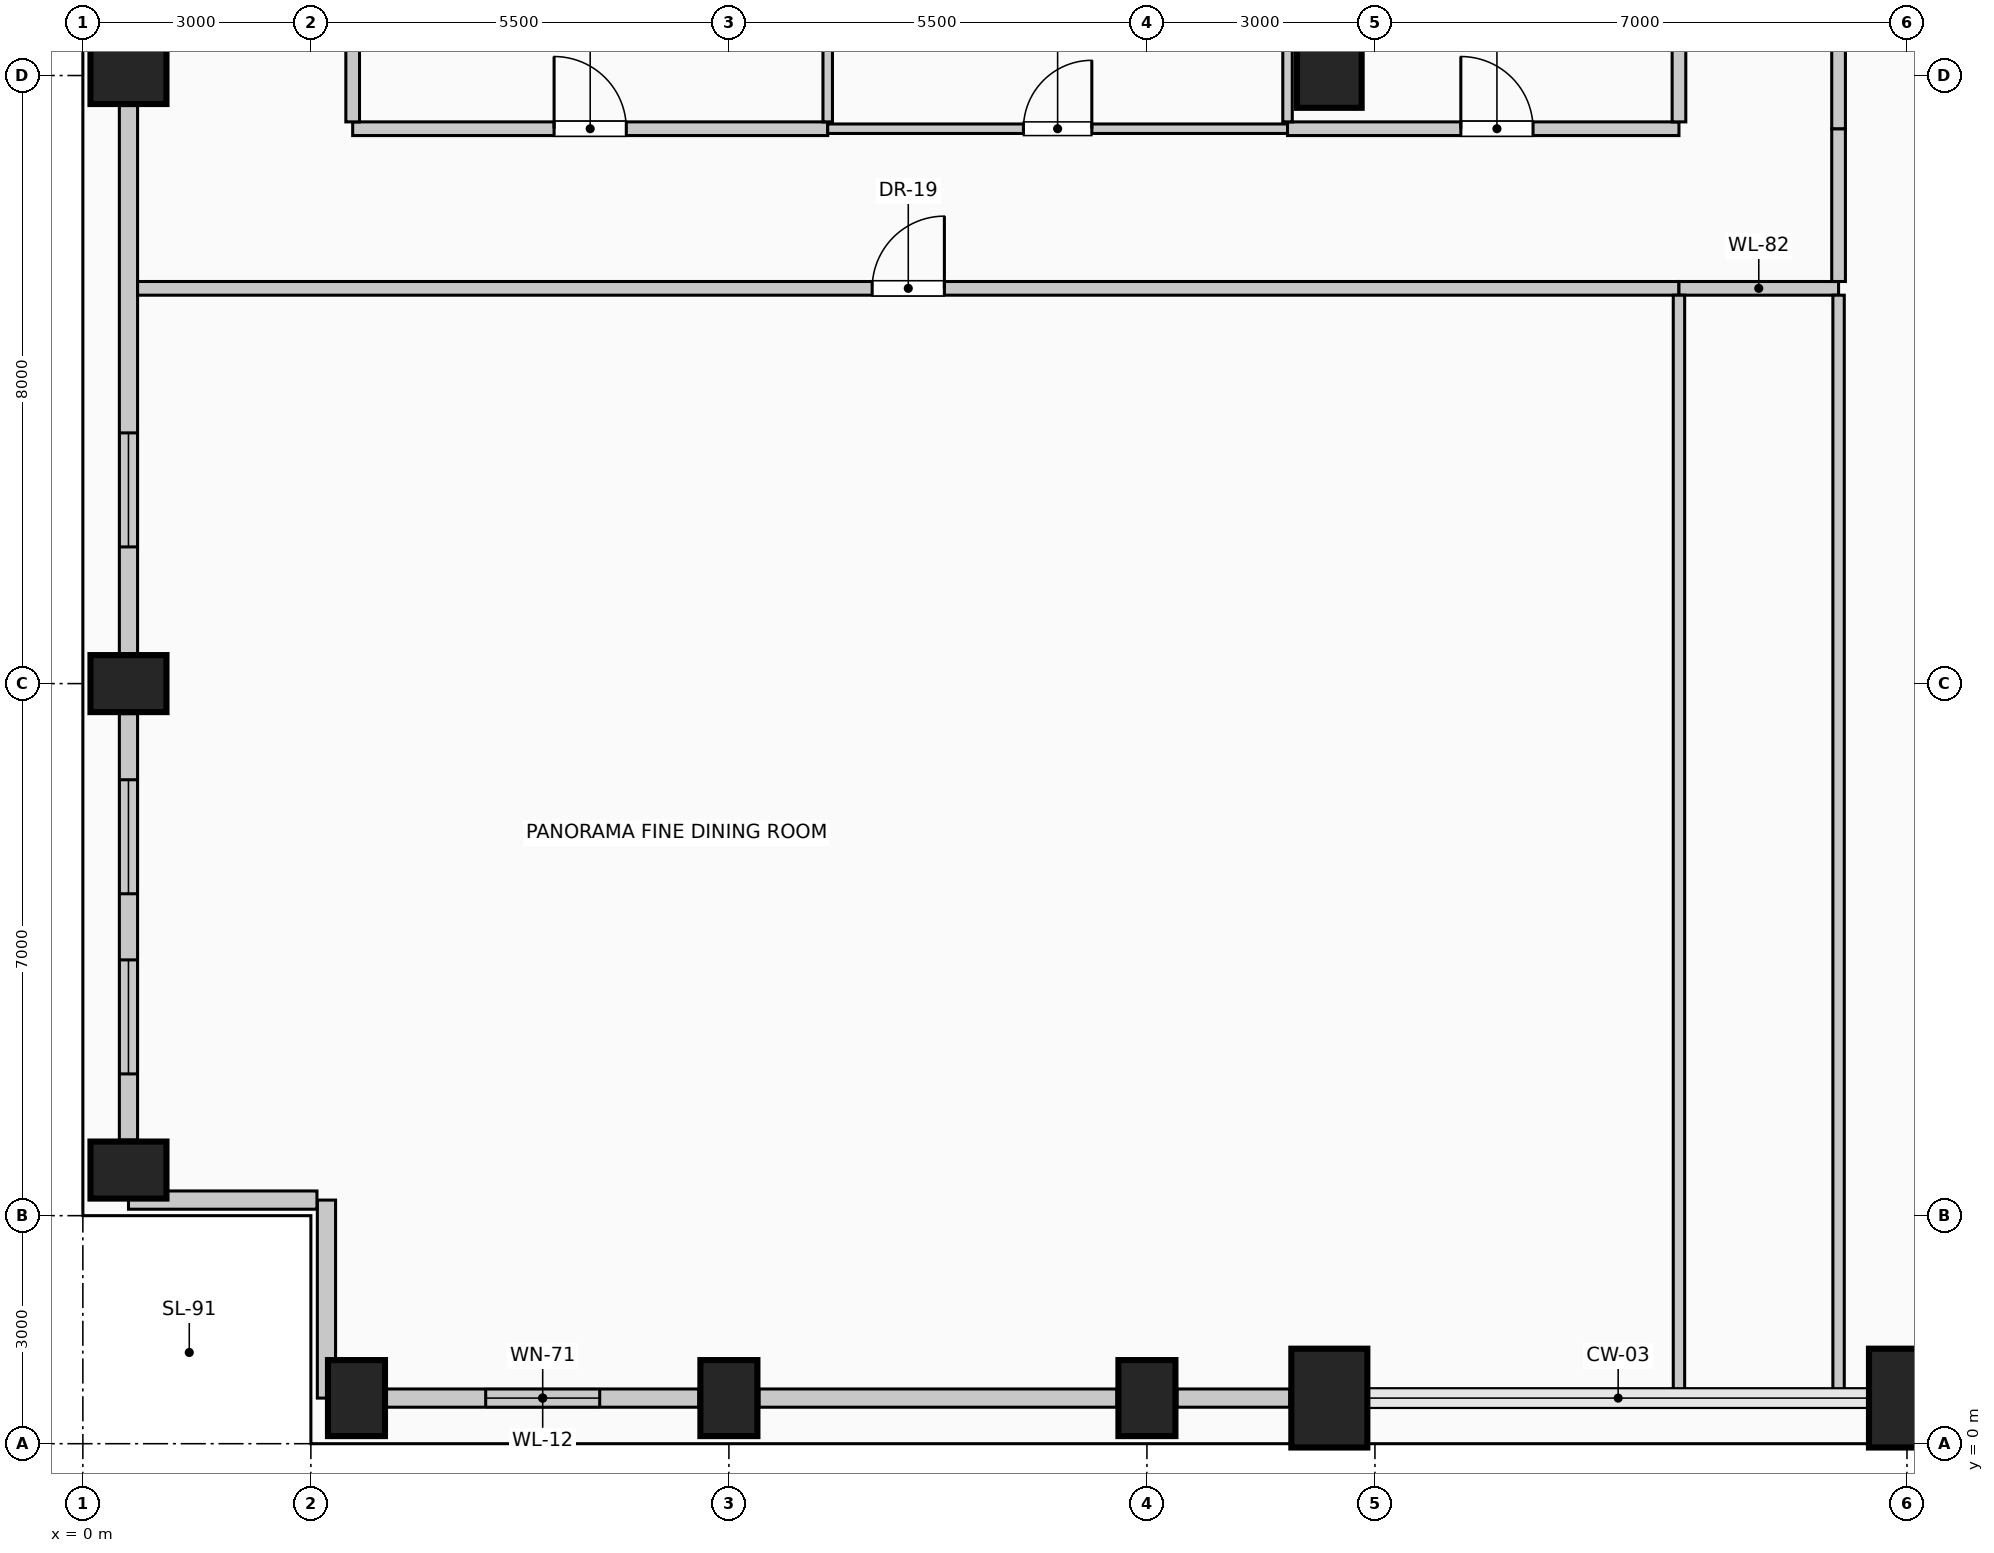
"""IFC4 building model, lengths in metres.
Left out: names, types, materials, properties, quantities, classifications, styles, units other than length and angle.
Written with IfcOpenShell. Run it as: python <this file> out.ifc"""

import sys

from ifc_helpers import new_model, si_unit, direction, frame, frame_2d, origin, origin_2d, place, context, subcontext, project, spatial, rectangle, circle, extrude, element, fill, save


model = new_model("IFC4")
c1 = context("Model", 3, precision=1e-05, world=origin(), true_north=direction((0.0, 1.0)))
c2 = subcontext(c1, "Body", "Model", "MODEL_VIEW")
j1 = project(units=[si_unit("LENGTHUNIT", "METRE"), si_unit("PLANEANGLEUNIT", "RADIAN")], contexts=[c1])
p1 = place(None, origin())
s1 = spatial("IfcSite", under=j1, at=p1, CompositionType="ELEMENT")
p2 = place(p1, origin())
s2 = spatial("IfcBuilding", under=s1, at=p2, CompositionType="ELEMENT")
p3 = place(p2, frame((0.0, 0.0, 243.8)))
s3 = spatial("IfcBuildingStorey", under=s2, at=p3, CompositionType="ELEMENT", Elevation=243.8)
for number, where, z_axis, x_axis in (
    (1, (3.6, 0.6, 0.0), (0.0, 0.0, 1.0), (1.0, 0.0, 0.0)),
    (2, (8.5, 0.6, 0.0), (0.0, 0.0, 1.0), (1.0, 0.0, 0.0)),
    (3, (14.0, 0.6, 0.0), (0.0, 0.0, 1.0), (1.0, 0.0, 0.0)),
):
    element("IfcColumn", number, at=place(p3, frame(where, z_axis=z_axis, x_axis=x_axis)), inside=s3, PredefinedType="COLUMN", context=c2, shape_type="SweptSolid", body=[
        extrude(rectangle(XDim=0.75, YDim=1.0, at=origin_2d()), origin(), (0.0, 0.0, 1.0), 4.8),
    ])
for number, where, z_axis, x_axis in (
    (4, (16.4, 0.6, 0.0), (0.0, 0.0, 1.0), (1.0, 0.0, 0.0)),
    (5, (24.0, 0.6, 0.0), (0.0, 0.0, 1.0), (1.0, 0.0, 0.0)),
):
    element("IfcColumn", number, at=place(p3, frame(where, z_axis=z_axis, x_axis=x_axis)), inside=s3, PredefinedType="COLUMN", context=c2, shape_type="SweptSolid", body=[
        extrude(rectangle(XDim=1.0, YDim=1.3, at=origin_2d()), origin(), (0.0, 0.0, 1.0), 4.8),
    ])
for number, where, z_axis, x_axis in (
    (6, (0.6, 3.6, 0.0), (0.0, 0.0, 1.0), (0.0, 1.0, 0.0)),
    (7, (0.6, 10.0, 0.0), (0.0, 0.0, 1.0), (0.0, 1.0, 0.0)),
    (8, (0.6, 18.0, 0.0), (0.0, 0.0, 1.0), (0.0, 1.0, 0.0)),
):
    element("IfcColumn", number, at=place(p3, frame(where, z_axis=z_axis, x_axis=x_axis)), inside=s3, PredefinedType="COLUMN", context=c2, shape_type="SweptSolid", body=[
        extrude(rectangle(XDim=0.75, YDim=1.0, at=origin_2d()), origin(), (0.0, 0.0, 1.0), 4.8),
    ])
p4 = place(p3, frame((16.4, 18.0, 0.0), z_axis=(0.0, 0.0, 1.0), x_axis=(1.0, 0.0, 0.0)))
e9 = element("IfcColumn", 9, at=p4, inside=s3, PredefinedType="COLUMN", context=c2, shape_type="SweptSolid", body=[
    extrude(circle(Radius=0.425, at=origin_2d()), origin(), (0.0, 0.0, 1.0), 4.8),
])
p5 = place(p3, frame((8.105, 0.6, 0.0), z_axis=(0.0, 0.0, 1.0), x_axis=(-1.0, 0.0, 0.0)))
e10 = element("IfcWall", 10, at=p5, inside=s3, PredefinedType="SOLIDWALL", context=c2, shape_type="SweptSolid", body=[
    extrude(rectangle(XDim=4.11, YDim=0.24, at=frame_2d((2.055, 0.0))), origin(), (0.0, 0.0, 1.0), 3.8),
])
p6 = place(p5, frame((1.305, 0.0, 0.42)))
e11 = element("IfcOpeningElement", 11, at=p6, cuts=e10, PredefinedType="OPENING", context=c2, shape_type="SweptSolid", body=[
    extrude(rectangle(XDim=1.5, YDim=2.2, at=frame_2d((0.75, 1.1))), frame((0.0, 0.13, 0.0), z_axis=(0.0, -1.0, 0.0), x_axis=(1.0, 0.0, 0.0)), (0.0, 0.0, 1.0), 0.26),
])
p7 = place(p3, frame((13.605, 0.6, 0.0), z_axis=(0.0, 0.0, 1.0), x_axis=(-1.0, 0.0, 0.0)))
e12 = element("IfcWall", 12, at=p7, inside=s3, PredefinedType="SOLIDWALL", context=c2, shape_type="SweptSolid", body=[
    extrude(rectangle(XDim=4.71, YDim=0.24, at=frame_2d((2.355, 0.0))), origin(), (0.0, 0.0, 1.0), 3.8),
])
p8 = place(p3, frame((15.88, 0.6, 0.0), z_axis=(0.0, 0.0, 1.0), x_axis=(-1.0, 0.0, 0.0)))
e13 = element("IfcWall", 13, at=p8, inside=s3, PredefinedType="SOLIDWALL", context=c2, shape_type="SweptSolid", body=[
    extrude(rectangle(XDim=1.485, YDim=0.24, at=frame_2d((0.742, 0.0))), origin(), (0.0, 0.0, 1.0), 3.8),
])
p9 = place(p3, frame((0.6, 3.995, 0.0), z_axis=(0.0, 0.0, 1.0), x_axis=(0.0, 1.0, 0.0)))
e14 = element("IfcWall", 14, at=p9, inside=s3, PredefinedType="SOLIDWALL", context=c2, shape_type="SweptSolid", body=[
    extrude(rectangle(XDim=5.61, YDim=0.24, at=frame_2d((2.805, 0.0))), origin(), (0.0, 0.0, 1.0), 3.8),
])
p10 = place(p9, frame((0.87, 0.0, 0.42)))
e15 = element("IfcOpeningElement", 15, at=p10, cuts=e14, PredefinedType="OPENING", context=c2, shape_type="SweptSolid", body=[
    extrude(rectangle(XDim=1.5, YDim=2.2, at=frame_2d((0.75, 1.1))), frame((0.0, 0.13, 0.0), z_axis=(0.0, -1.0, 0.0), x_axis=(1.0, 0.0, 0.0)), (0.0, 0.0, 1.0), 0.26),
])
p11 = place(p9, frame((3.24, 0.0, 0.42)))
e16 = element("IfcOpeningElement", 16, at=p11, cuts=e14, PredefinedType="OPENING", context=c2, shape_type="SweptSolid", body=[
    extrude(rectangle(XDim=1.5, YDim=2.2, at=frame_2d((0.75, 1.1))), frame((0.0, 0.13, 0.0), z_axis=(0.0, -1.0, 0.0), x_axis=(1.0, 0.0, 0.0)), (0.0, 0.0, 1.0), 0.26),
])
p12 = place(p3, frame((0.6, 10.395, 0.0), z_axis=(0.0, 0.0, 1.0), x_axis=(0.0, 1.0, 0.0)))
e17 = element("IfcWall", 17, at=p12, inside=s3, PredefinedType="SOLIDWALL", context=c2, shape_type="SweptSolid", body=[
    extrude(rectangle(XDim=7.21, YDim=0.24, at=frame_2d((3.605, 0.0))), origin(), (0.0, 0.0, 1.0), 3.8),
])
p13 = place(p12, frame((1.403, 0.0, 0.42)))
e18 = element("IfcOpeningElement", 18, at=p13, cuts=e17, PredefinedType="OPENING", context=c2, shape_type="SweptSolid", body=[
    extrude(rectangle(XDim=1.5, YDim=2.2, at=frame_2d((0.75, 1.1))), frame((0.0, 0.13, 0.0), z_axis=(0.0, -1.0, 0.0), x_axis=(1.0, 0.0, 0.0)), (0.0, 0.0, 1.0), 0.26),
])
p14 = place(p3, frame((3.205, 0.6, 0.0), z_axis=(0.0, 0.0, 1.0), x_axis=(0.0, 1.0, 0.0)))
e19 = element("IfcWall", 19, at=p14, inside=s3, PredefinedType="SOLIDWALL", context=c2, shape_type="SweptSolid", body=[
    extrude(rectangle(XDim=2.605, YDim=0.24, at=frame_2d((1.302, 0.0))), origin(), (0.0, 0.0, 1.0), 4.55),
])
p15 = place(p3, frame((3.08, 3.205, 0.0), z_axis=(0.0, 0.0, 1.0), x_axis=(-1.0, 0.0, 0.0)))
e20 = element("IfcWall", 20, at=p15, inside=s3, PredefinedType="SOLIDWALL", context=c2, shape_type="SweptSolid", body=[
    extrude(rectangle(XDim=2.48, YDim=0.24, at=frame_2d((1.24, 0.0))), origin(), (0.0, 0.0, 1.0), 4.55),
])
p16 = place(p3, frame((0.72, 15.2, 0.0), z_axis=(0.0, 0.0, 1.0), x_axis=(1.0, 0.0, 0.0)))
e21 = element("IfcWall", 21, at=p16, inside=s3, PredefinedType="PARTITIONING", context=c2, shape_type="SweptSolid", body=[
    extrude(rectangle(XDim=20.28, YDim=0.18, at=frame_2d((10.14, 0.0))), origin(), (0.0, 0.0, 1.0), 4.55),
])
p17 = place(p16, frame((9.665, 0.0, 0.0)))
e22 = element("IfcOpeningElement", 22, at=p17, cuts=e21, PredefinedType="OPENING", context=c2, shape_type="SweptSolid", body=[
    extrude(rectangle(XDim=0.95, YDim=2.15, at=frame_2d((0.475, 1.075))), frame((0.0, 0.1, 0.0), z_axis=(0.0, -1.0, 0.0), x_axis=(1.0, 0.0, 0.0)), (0.0, 0.0, 1.0), 0.2),
])
p18 = place(p3, frame((21.0, 15.2, 0.0), z_axis=(0.0, 0.0, 1.0), x_axis=(1.0, 0.0, 0.0)))
e23 = element("IfcWall", 23, at=p18, inside=s3, PredefinedType="PARTITIONING", context=c2, shape_type="SweptSolid", body=[
    extrude(rectangle(XDim=2.1, YDim=0.18, at=frame_2d((1.05, 0.0))), origin(), (0.0, 0.0, 1.0), 4.55),
])
p19 = place(p3, frame((3.55, 17.3, 0.0), z_axis=(0.0, 0.0, 1.0), x_axis=(1.0, 0.0, 0.0)))
e24 = element("IfcWall", 24, at=p19, inside=s3, PredefinedType="PARTITIONING", context=c2, shape_type="SweptSolid", body=[
    extrude(rectangle(XDim=6.25, YDim=0.18, at=frame_2d((3.125, 0.0))), origin(), (0.0, 0.0, 1.0), 4.55),
])
p20 = place(p19, frame((2.65, 0.0, 0.0)))
e25 = element("IfcOpeningElement", 25, at=p20, cuts=e24, PredefinedType="OPENING", context=c2, shape_type="SweptSolid", body=[
    extrude(rectangle(XDim=0.95, YDim=2.15, at=frame_2d((0.475, 1.075))), frame((0.0, 0.1, 0.0), z_axis=(0.0, -1.0, 0.0), x_axis=(1.0, 0.0, 0.0)), (0.0, 0.0, 1.0), 0.2),
])
p21 = place(p3, frame((9.8, 17.3, 0.0), z_axis=(0.0, 0.0, 1.0), x_axis=(1.0, 0.0, 0.0)))
e26 = element("IfcWall", 26, at=p21, inside=s3, PredefinedType="PARTITIONING", context=c2, shape_type="SweptSolid", body=[
    extrude(rectangle(XDim=6.05, YDim=0.125, at=frame_2d((3.025, 0.0))), origin(), (0.0, 0.0, 1.0), 4.55),
])
p22 = place(p21, frame((2.575, 0.0, 0.0)))
e27 = element("IfcOpeningElement", 27, at=p22, cuts=e26, PredefinedType="OPENING", context=c2, shape_type="SweptSolid", body=[
    extrude(rectangle(XDim=0.9, YDim=2.1, at=frame_2d((0.45, 1.05))), frame((0.0, 0.073, 0.0), z_axis=(0.0, -1.0, 0.0), x_axis=(1.0, 0.0, 0.0)), (0.0, 0.0, 1.0), 0.145),
])
p23 = place(p3, frame((15.85, 17.3, 0.0), z_axis=(0.0, 0.0, 1.0), x_axis=(1.0, 0.0, 0.0)))
e28 = element("IfcWall", 28, at=p23, inside=s3, PredefinedType="PARTITIONING", context=c2, shape_type="SweptSolid", body=[
    extrude(rectangle(XDim=5.15, YDim=0.18, at=frame_2d((2.575, 0.0))), origin(), (0.0, 0.0, 1.0), 4.55),
])
p24 = place(p23, frame((2.28, 0.0, 0.0)))
e29 = element("IfcOpeningElement", 29, at=p24, cuts=e28, PredefinedType="OPENING", context=c2, shape_type="SweptSolid", body=[
    extrude(rectangle(XDim=0.95, YDim=2.15, at=frame_2d((0.475, 1.075))), frame((0.0, 0.1, 0.0), z_axis=(0.0, -1.0, 0.0), x_axis=(1.0, 0.0, 0.0)), (0.0, 0.0, 1.0), 0.2),
])
p25 = place(p3, frame((3.55, 17.39, 0.0), z_axis=(0.0, 0.0, 1.0), x_axis=(0.0, 1.0, 0.0)))
e30 = element("IfcWall", 30, at=p25, inside=s3, PredefinedType="PARTITIONING", context=c2, shape_type="SweptSolid", body=[
    extrude(rectangle(XDim=7.335, YDim=0.18, at=frame_2d((3.667, 0.0))), origin(), (0.0, 0.0, 1.0), 4.55),
])
for number, where, z_axis, x_axis in (
    (31, (9.8, 17.39, 0.0), (0.0, 0.0, 1.0), (0.0, 1.0, 0.0)),
    (32, (15.85, 17.39, 0.0), (0.0, 0.0, 1.0), (0.0, 1.0, 0.0)),
):
    element("IfcWall", number, at=place(p3, frame(where, z_axis=z_axis, x_axis=x_axis)), inside=s3, PredefinedType="PARTITIONING", context=c2, shape_type="SweptSolid", body=[
        extrude(rectangle(XDim=7.335, YDim=0.125, at=frame_2d((3.667, 0.0))), origin(), (0.0, 0.0, 1.0), 4.55),
    ])
p26 = place(p3, frame((21.0, 0.6, 0.0), z_axis=(0.0, 0.0, 1.0), x_axis=(0.0, 1.0, 0.0)))
e33 = element("IfcWall", 33, at=p26, inside=s3, PredefinedType="PARTITIONING", context=c2, shape_type="SweptSolid", body=[
    extrude(rectangle(XDim=14.51, YDim=0.15, at=frame_2d((7.255, 0.0))), origin(), (0.0, 0.0, 1.0), 4.55),
])
p27 = place(p3, frame((21.0, 17.39, 0.0), z_axis=(0.0, 0.0, 1.0), x_axis=(0.0, 1.0, 0.0)))
e34 = element("IfcWall", 34, at=p27, inside=s3, PredefinedType="PARTITIONING", context=c2, shape_type="SweptSolid", body=[
    extrude(rectangle(XDim=7.335, YDim=0.18, at=frame_2d((3.667, 0.0))), origin(), (0.0, 0.0, 1.0), 4.55),
])
p28 = place(p3, frame((23.1, 0.6, 0.0), z_axis=(0.0, 0.0, 1.0), x_axis=(0.0, 1.0, 0.0)))
e35 = element("IfcWall", 35, at=p28, inside=s3, PredefinedType="PARTITIONING", context=c2, shape_type="SweptSolid", body=[
    extrude(rectangle(XDim=14.51, YDim=0.15, at=frame_2d((7.255, 0.0))), origin(), (0.0, 0.0, 1.0), 4.55),
])
p29 = place(p3, frame((23.1, 15.29, 0.0), z_axis=(0.0, 0.0, 1.0), x_axis=(0.0, 1.0, 0.0)))
e36 = element("IfcWall", 36, at=p29, inside=s3, PredefinedType="PARTITIONING", context=c2, shape_type="SweptSolid", body=[
    extrude(rectangle(XDim=2.01, YDim=0.18, at=frame_2d((1.005, 0.0))), origin(), (0.0, 0.0, 1.0), 4.55),
])
p30 = place(p3, frame((23.1, 17.3, 0.0), z_axis=(0.0, 0.0, 1.0), x_axis=(0.0, 1.0, 0.0)))
e37 = element("IfcWall", 37, at=p30, inside=s3, PredefinedType="PARTITIONING", context=c2, shape_type="SweptSolid", body=[
    extrude(rectangle(XDim=9.51, YDim=0.18, at=frame_2d((4.755, 0.0))), origin(), (0.0, 0.0, 1.0), 4.55),
])
p31 = place(p6, origin())
e38 = element("IfcWindow", 38, at=p31, inside=s3, PartitioningType="SINGLE_PANEL", PredefinedType="WINDOW", context=c2, shape_type="SweptSolid", body=[
    extrude(rectangle(XDim=1.5, YDim=2.2, at=frame_2d((0.75, 1.1))), frame((0.0, 0.03, 0.0), z_axis=(0.0, -1.0, 0.0), x_axis=(1.0, 0.0, 0.0)), (0.0, 0.0, 1.0), 0.06),
])
fill(e11, e38)
p32 = place(p10, origin())
e39 = element("IfcWindow", 39, at=p32, inside=s3, PartitioningType="SINGLE_PANEL", PredefinedType="WINDOW", context=c2, shape_type="SweptSolid", body=[
    extrude(rectangle(XDim=1.5, YDim=2.2, at=frame_2d((0.75, 1.1))), frame((0.0, 0.03, 0.0), z_axis=(0.0, -1.0, 0.0), x_axis=(1.0, 0.0, 0.0)), (0.0, 0.0, 1.0), 0.06),
])
fill(e15, e39)
p33 = place(p11, origin())
e40 = element("IfcWindow", 40, at=p33, inside=s3, PartitioningType="SINGLE_PANEL", PredefinedType="WINDOW", context=c2, shape_type="SweptSolid", body=[
    extrude(rectangle(XDim=1.5, YDim=2.2, at=frame_2d((0.75, 1.1))), frame((0.0, 0.03, 0.0), z_axis=(0.0, -1.0, 0.0), x_axis=(1.0, 0.0, 0.0)), (0.0, 0.0, 1.0), 0.06),
])
fill(e16, e40)
p34 = place(p13, origin())
e41 = element("IfcWindow", 41, at=p34, inside=s3, PartitioningType="SINGLE_PANEL", PredefinedType="WINDOW", context=c2, shape_type="SweptSolid", body=[
    extrude(rectangle(XDim=1.5, YDim=2.2, at=frame_2d((0.75, 1.1))), frame((0.0, 0.03, 0.0), z_axis=(0.0, -1.0, 0.0), x_axis=(1.0, 0.0, 0.0)), (0.0, 0.0, 1.0), 0.06),
])
fill(e18, e41)
p35 = place(p17, origin())
e42 = element("IfcDoor", 42, at=p35, inside=s3, OperationType="SINGLE_SWING_RIGHT", PredefinedType="DOOR", context=c2, shape_type="SweptSolid", body=[
    extrude(rectangle(XDim=0.95, YDim=2.15, at=frame_2d((0.475, 1.075))), frame((0.0, 0.025, 0.0), z_axis=(0.0, -1.0, 0.0), x_axis=(1.0, 0.0, 0.0)), (0.0, 0.0, 1.0), 0.05),
])
fill(e22, e42)
p36 = place(p20, origin())
e43 = element("IfcDoor", 43, at=p36, inside=s3, OperationType="SINGLE_SWING_LEFT", PredefinedType="DOOR", context=c2, shape_type="SweptSolid", body=[
    extrude(rectangle(XDim=0.95, YDim=2.15, at=frame_2d((0.475, 1.075))), frame((0.0, 0.025, 0.0), z_axis=(0.0, -1.0, 0.0), x_axis=(1.0, 0.0, 0.0)), (0.0, 0.0, 1.0), 0.05),
])
fill(e25, e43)
p37 = place(p22, origin())
e44 = element("IfcDoor", 44, at=p37, inside=s3, OperationType="SINGLE_SWING_RIGHT", PredefinedType="DOOR", context=c2, shape_type="SweptSolid", body=[
    extrude(rectangle(XDim=0.9, YDim=2.1, at=frame_2d((0.45, 1.05))), frame((0.0, 0.025, 0.0), z_axis=(0.0, -1.0, 0.0), x_axis=(1.0, 0.0, 0.0)), (0.0, 0.0, 1.0), 0.05),
])
fill(e27, e44)
p38 = place(p24, origin())
e45 = element("IfcDoor", 45, at=p38, inside=s3, OperationType="SINGLE_SWING_LEFT", PredefinedType="DOOR", context=c2, shape_type="SweptSolid", body=[
    extrude(rectangle(XDim=0.95, YDim=2.15, at=frame_2d((0.475, 1.075))), frame((0.0, 0.025, 0.0), z_axis=(0.0, -1.0, 0.0), x_axis=(1.0, 0.0, 0.0)), (0.0, 0.0, 1.0), 0.05),
])
fill(e29, e45)
save(model, sys.argv[1])
